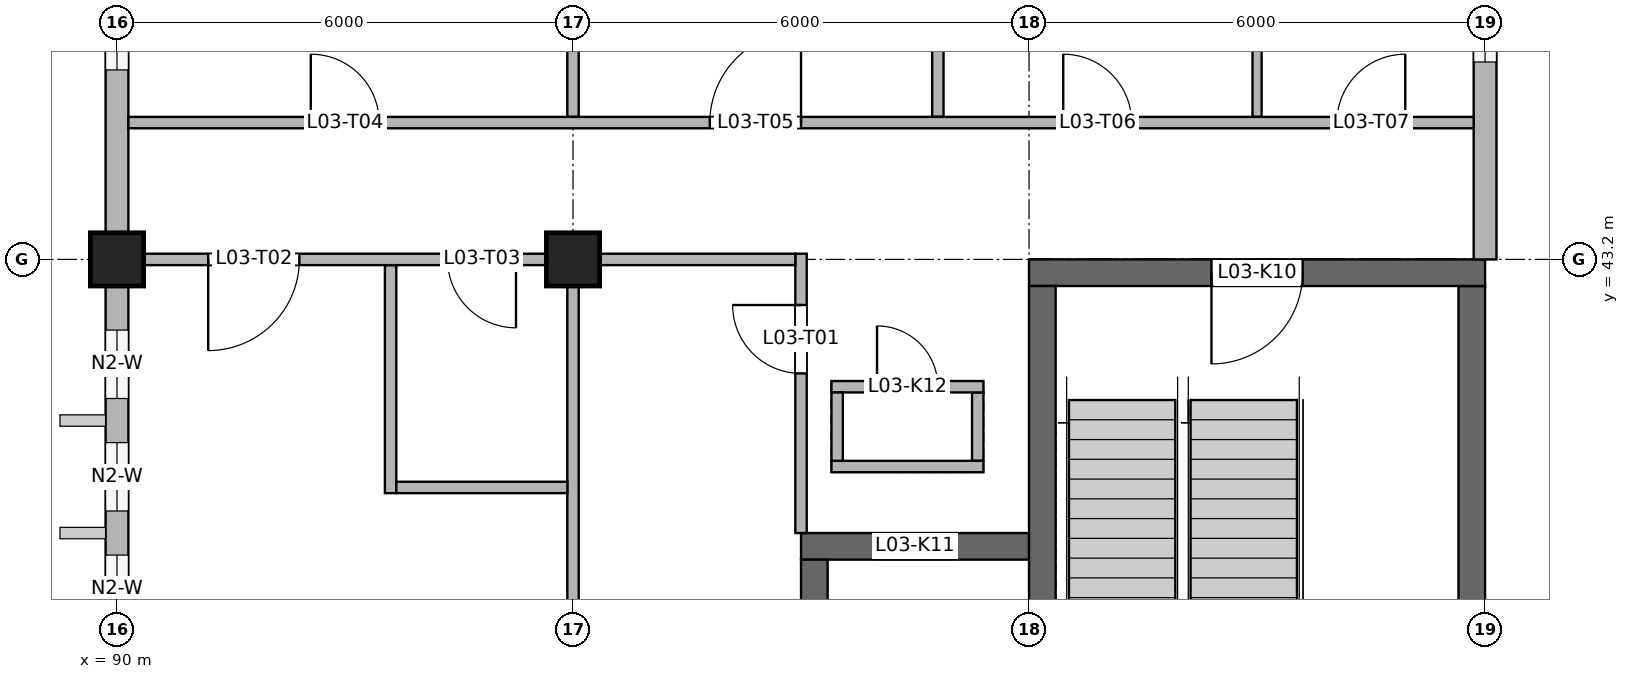
"""IFC4 building model, lengths in metres.
Left out: names, types, materials, properties, quantities, classifications, styles, units other than length and angle.
Written with IfcOpenShell. Run it as: python <this file> out.ifc"""

import sys

from ifc_helpers import new_model, si_unit, direction, frame, frame_2d, origin, origin_2d, place, context, subcontext, project, spatial, rectangle, extrude, element, fill, save


model = new_model("IFC4")
c1 = context("Model", 3, precision=1e-05, world=origin(), true_north=direction((0.0, 1.0)))
c2 = subcontext(c1, "Body", "Model", "MODEL_VIEW")
j1 = project(units=[si_unit("LENGTHUNIT", "METRE"), si_unit("PLANEANGLEUNIT", "RADIAN")], contexts=[c1])
p1 = place(None, origin())
s1 = spatial("IfcSite", under=j1, at=p1, CompositionType="ELEMENT")
p2 = place(p1, origin())
s2 = spatial("IfcBuilding", under=s1, at=p2, CompositionType="ELEMENT")
p3 = place(p2, frame((0.0, 0.0, 12.6)))
s3 = spatial("IfcBuildingStorey", under=s2, at=p3, CompositionType="ELEMENT", Elevation=12.6)
p4 = place(p3, frame((102.0, 43.025, 0.0), z_axis=(0.0, 0.0, 1.0), x_axis=(1.0, 0.0, 0.0)))
e1 = element("IfcWall", 1, at=p4, inside=s3, PredefinedType="SHEAR", context=c2, shape_type="SweptSolid", body=[
    extrude(rectangle(XDim=6.0, YDim=0.35, at=frame_2d((3.0, 0.0))), origin(), (0.0, 0.0, 1.0), 4.0),
])
p5 = place(p4, frame((2.4, 0.0, 0.0)))
e2 = element("IfcOpeningElement", 2, at=p5, cuts=e1, PredefinedType="OPENING", context=c2, shape_type="SweptSolid", body=[
    extrude(rectangle(XDim=1.2, YDim=2.1, at=frame_2d((0.6, 1.05))), frame((0.0, 0.185, 0.0), z_axis=(0.0, -1.0, 0.0), x_axis=(1.0, 0.0, 0.0)), (0.0, 0.0, 1.0), 0.37),
])
for number, where, z_axis, x_axis in (
    (3, (102.175, 36.35, 0.0), (0.0, 0.0, 1.0), (0.0, 1.0, 0.0)),
    (4, (107.825, 36.35, 0.0), (0.0, 0.0, 1.0), (0.0, 1.0, 0.0)),
):
    element("IfcWall", number, at=place(p3, frame(where, z_axis=z_axis, x_axis=x_axis)), inside=s3, PredefinedType="SHEAR", context=c2, shape_type="SweptSolid", body=[
        extrude(rectangle(XDim=6.5, YDim=0.35, at=frame_2d((3.25, 0.0))), origin(), (0.0, 0.0, 1.0), 4.0),
    ])
p6 = place(p3, frame((99.0, 39.425, 0.0), z_axis=(0.0, 0.0, 1.0), x_axis=(1.0, 0.0, 0.0)))
e5 = element("IfcWall", 5, at=p6, inside=s3, PredefinedType="SHEAR", context=c2, shape_type="SweptSolid", body=[
    extrude(rectangle(XDim=3.0, YDim=0.35, at=frame_2d((1.5, 0.0))), origin(), (0.0, 0.0, 1.0), 4.2),
])
p7 = place(p6, frame((0.95, 0.0, 0.0)))
e6 = element("IfcOpeningElement", 6, at=p7, cuts=e5, PredefinedType="OPENING", context=c2, shape_type="SweptSolid", body=[
    extrude(rectangle(XDim=1.1, YDim=2.1, at=frame_2d((0.55, 1.05))), frame((0.0, 0.185, 0.0), z_axis=(0.0, -1.0, 0.0), x_axis=(1.0, 0.0, 0.0)), (0.0, 0.0, 1.0), 0.37),
])
p8 = place(p3, frame((99.175, 36.35, 0.0), z_axis=(0.0, 0.0, 1.0), x_axis=(0.0, 1.0, 0.0)))
e7 = element("IfcWall", 7, at=p8, inside=s3, PredefinedType="SHEAR", context=c2, shape_type="SweptSolid", body=[
    extrude(rectangle(XDim=2.9, YDim=0.35, at=frame_2d((1.45, 0.0))), origin(), (0.0, 0.0, 1.0), 4.2),
])
p9 = place(p3, frame((99.4, 40.475, 0.0), z_axis=(0.0, 0.0, 1.0), x_axis=(1.0, 0.0, 0.0)))
e8 = element("IfcWall", 8, at=p9, inside=s3, PredefinedType="SOLIDWALL", context=c2, shape_type="SweptSolid", body=[
    extrude(rectangle(XDim=2.0, YDim=0.15, at=frame_2d((1.0, 0.0))), origin(), (0.0, 0.0, 1.0), 4.2),
])
p10 = place(p3, frame((99.4, 41.525, 0.0), z_axis=(0.0, 0.0, 1.0), x_axis=(1.0, 0.0, 0.0)))
e9 = element("IfcWall", 9, at=p10, inside=s3, PredefinedType="SOLIDWALL", context=c2, shape_type="SweptSolid", body=[
    extrude(rectangle(XDim=2.0, YDim=0.15, at=frame_2d((1.0, 0.0))), origin(), (0.0, 0.0, 1.0), 4.2),
])
p11 = place(p10, frame((0.6, 0.0, 0.0)))
e10 = element("IfcOpeningElement", 10, at=p11, cuts=e9, PredefinedType="OPENING", context=c2, shape_type="SweptSolid", body=[
    extrude(rectangle(XDim=0.8, YDim=2.1, at=frame_2d((0.4, 1.05))), frame((0.0, 0.085, 0.0), z_axis=(0.0, -1.0, 0.0), x_axis=(1.0, 0.0, 0.0)), (0.0, 0.0, 1.0), 0.17),
])
for number, where, z_axis, x_axis in (
    (11, (99.475, 40.55, 0.0), (0.0, 0.0, 1.0), (0.0, 1.0, 0.0)),
    (12, (101.325, 40.55, 0.0), (0.0, 0.0, 1.0), (0.0, 1.0, 0.0)),
):
    element("IfcWall", number, at=place(p3, frame(where, z_axis=z_axis, x_axis=x_axis)), inside=s3, PredefinedType="SOLIDWALL", context=c2, shape_type="SweptSolid", body=[
        extrude(rectangle(XDim=0.9, YDim=0.15, at=frame_2d((0.45, 0.0))), origin(), (0.0, 0.0, 1.0), 4.2),
    ])
for number, where, z_axis, x_axis in (
    (13, (90.0, 43.2, 0.0), (0.0, 0.0, 1.0), (1.0, 0.0, 0.0)),
    (14, (96.0, 43.2, 0.0), (0.0, 0.0, 1.0), (1.0, 0.0, 0.0)),
):
    element("IfcColumn", number, at=place(p3, frame(where, z_axis=z_axis, x_axis=x_axis)), inside=s3, PredefinedType="COLUMN", context=c2, shape_type="SweptSolid", body=[
        extrude(rectangle(XDim=0.7, YDim=0.7, at=origin_2d()), origin(), (0.0, 0.0, 1.0), 4.0),
    ])
p12 = place(p3, frame((90.0, 36.35, 0.0), z_axis=(0.0, 0.0, 1.0), x_axis=(0.0, 1.0, 0.0)))
e15 = element("IfcWall", 15, at=p12, inside=s3, PredefinedType="SOLIDWALL", context=c2, shape_type="SweptSolid", body=[
    extrude(rectangle(XDim=6.5, YDim=0.3, at=frame_2d((3.25, 0.0))), origin(), (0.0, 0.0, 1.0), 3.2),
])
p13 = place(p12, frame((0.58, 0.0, 0.9)))
e16 = element("IfcOpeningElement", 16, at=p13, cuts=e15, PredefinedType="OPENING", context=c2, shape_type="SweptSolid", body=[
    extrude(rectangle(XDim=0.9, YDim=1.2, at=frame_2d((0.45, 0.6))), frame((0.0, 0.16, 0.0), z_axis=(0.0, -1.0, 0.0), x_axis=(1.0, 0.0, 0.0)), (0.0, 0.0, 1.0), 0.32),
])
p14 = place(p12, frame((2.06, 0.0, 0.9)))
e17 = element("IfcOpeningElement", 17, at=p14, cuts=e15, PredefinedType="OPENING", context=c2, shape_type="SweptSolid", body=[
    extrude(rectangle(XDim=0.9, YDim=1.2, at=frame_2d((0.45, 0.6))), frame((0.0, 0.16, 0.0), z_axis=(0.0, -1.0, 0.0), x_axis=(1.0, 0.0, 0.0)), (0.0, 0.0, 1.0), 0.32),
])
p15 = place(p12, frame((3.54, 0.0, 0.9)))
e18 = element("IfcOpeningElement", 18, at=p15, cuts=e15, PredefinedType="OPENING", context=c2, shape_type="SweptSolid", body=[
    extrude(rectangle(XDim=0.9, YDim=1.2, at=frame_2d((0.45, 0.6))), frame((0.0, 0.16, 0.0), z_axis=(0.0, -1.0, 0.0), x_axis=(1.0, 0.0, 0.0)), (0.0, 0.0, 1.0), 0.32),
])
p16 = place(p12, frame((5.02, 0.0, 0.9)))
e19 = element("IfcOpeningElement", 19, at=p16, cuts=e15, PredefinedType="OPENING", context=c2, shape_type="SweptSolid", body=[
    extrude(rectangle(XDim=0.9, YDim=1.2, at=frame_2d((0.45, 0.6))), frame((0.0, 0.16, 0.0), z_axis=(0.0, -1.0, 0.0), x_axis=(1.0, 0.0, 0.0)), (0.0, 0.0, 1.0), 0.32),
])
p17 = place(p3, frame((90.0, 43.55, 0.0), z_axis=(0.0, 0.0, 1.0), x_axis=(0.0, 1.0, 0.0)))
e20 = element("IfcWall", 20, at=p17, inside=s3, PredefinedType="SOLIDWALL", context=c2, shape_type="SweptSolid", body=[
    extrude(rectangle(XDim=6.85, YDim=0.3, at=frame_2d((3.425, 0.0))), origin(), (0.0, 0.0, 1.0), 3.1),
])
p18 = place(p17, frame((2.143, 0.0, 0.9)))
e21 = element("IfcOpeningElement", 21, at=p18, cuts=e20, PredefinedType="OPENING", context=c2, shape_type="SweptSolid", body=[
    extrude(rectangle(XDim=0.9, YDim=1.2, at=frame_2d((0.45, 0.6))), frame((0.0, 0.16, 0.0), z_axis=(0.0, -1.0, 0.0), x_axis=(1.0, 0.0, 0.0)), (0.0, 0.0, 1.0), 0.32),
])
p19 = place(p17, frame((3.457, 0.0, 0.9)))
e22 = element("IfcOpeningElement", 22, at=p19, cuts=e20, PredefinedType="OPENING", context=c2, shape_type="SweptSolid", body=[
    extrude(rectangle(XDim=0.9, YDim=1.2, at=frame_2d((0.45, 0.6))), frame((0.0, 0.16, 0.0), z_axis=(0.0, -1.0, 0.0), x_axis=(1.0, 0.0, 0.0)), (0.0, 0.0, 1.0), 0.32),
])
p20 = place(p3, frame((108.0, 43.2, 0.0), z_axis=(0.0, 0.0, 1.0), x_axis=(0.0, 1.0, 0.0)))
e23 = element("IfcWall", 23, at=p20, inside=s3, PredefinedType="SOLIDWALL", context=c2, shape_type="SweptSolid", body=[
    extrude(rectangle(XDim=6.85, YDim=0.3, at=frame_2d((3.425, 0.0))), origin(), (0.0, 0.0, 1.0), 3.1),
])
p21 = place(p20, frame((2.597, 0.0, 0.9)))
e24 = element("IfcOpeningElement", 24, at=p21, cuts=e23, PredefinedType="OPENING", context=c2, shape_type="SweptSolid", body=[
    extrude(rectangle(XDim=0.9, YDim=1.2, at=frame_2d((0.45, 0.6))), frame((0.0, 0.16, 0.0), z_axis=(0.0, -1.0, 0.0), x_axis=(1.0, 0.0, 0.0)), (0.0, 0.0, 1.0), 0.32),
])
p22 = place(p20, frame((4.015, 0.0, 0.9)))
e25 = element("IfcOpeningElement", 25, at=p22, cuts=e23, PredefinedType="OPENING", context=c2, shape_type="SweptSolid", body=[
    extrude(rectangle(XDim=0.9, YDim=1.2, at=frame_2d((0.45, 0.6))), frame((0.0, 0.16, 0.0), z_axis=(0.0, -1.0, 0.0), x_axis=(1.0, 0.0, 0.0)), (0.0, 0.0, 1.0), 0.32),
])
p23 = place(p20, frame((5.433, 0.0, 0.9)))
e26 = element("IfcOpeningElement", 26, at=p23, cuts=e23, PredefinedType="OPENING", context=c2, shape_type="SweptSolid", body=[
    extrude(rectangle(XDim=0.9, YDim=1.2, at=frame_2d((0.45, 0.6))), frame((0.0, 0.16, 0.0), z_axis=(0.0, -1.0, 0.0), x_axis=(1.0, 0.0, 0.0)), (0.0, 0.0, 1.0), 0.32),
])
p24 = place(p3, frame((93.6, 40.125, 0.0), z_axis=(0.0, 0.0, 1.0), x_axis=(0.0, 1.0, 0.0)))
e27 = element("IfcWall", 27, at=p24, inside=s3, PredefinedType="PARTITIONING", context=c2, shape_type="SweptSolid", body=[
    extrude(rectangle(XDim=3.0, YDim=0.15, at=frame_2d((1.5, 0.0))), origin(), (0.0, 0.0, 1.0), 3.3),
])
p25 = place(p3, frame((96.0, 36.15, 0.0), z_axis=(0.0, 0.0, 1.0), x_axis=(0.0, 1.0, 0.0)))
e28 = element("IfcWall", 28, at=p25, inside=s3, PredefinedType="PARTITIONING", context=c2, shape_type="SweptSolid", body=[
    extrude(rectangle(XDim=6.975, YDim=0.15, at=frame_2d((3.488, 0.0))), origin(), (0.0, 0.0, 1.0), 3.2),
])
p26 = place(p3, frame((96.0, 45.075, 0.0), z_axis=(0.0, 0.0, 1.0), x_axis=(0.0, 1.0, 0.0)))
e29 = element("IfcWall", 29, at=p26, inside=s3, PredefinedType="PARTITIONING", context=c2, shape_type="SweptSolid", body=[
    extrude(rectangle(XDim=5.325, YDim=0.15, at=frame_2d((2.663, 0.0))), origin(), (0.0, 0.0, 1.0), 4.0),
])
p27 = place(p3, frame((99.0, 39.6, 0.0), z_axis=(0.0, 0.0, 1.0), x_axis=(0.0, 1.0, 0.0)))
e30 = element("IfcWall", 30, at=p27, inside=s3, PredefinedType="PARTITIONING", context=c2, shape_type="SweptSolid", body=[
    extrude(rectangle(XDim=3.675, YDim=0.15, at=frame_2d((1.837, 0.0))), origin(), (0.0, 0.0, 1.0), 4.0),
])
p28 = place(p27, frame((2.1, 0.0, 0.0)))
e31 = element("IfcOpeningElement", 31, at=p28, cuts=e30, PredefinedType="OPENING", context=c2, shape_type="SweptSolid", body=[
    extrude(rectangle(XDim=0.9, YDim=2.1, at=frame_2d((0.45, 1.05))), frame((0.0, 0.085, 0.0), z_axis=(0.0, -1.0, 0.0), x_axis=(1.0, 0.0, 0.0)), (0.0, 0.0, 1.0), 0.17),
])
p29 = place(p3, frame((100.8, 45.075, 0.0), z_axis=(0.0, 0.0, 1.0), x_axis=(0.0, 1.0, 0.0)))
e32 = element("IfcWall", 32, at=p29, inside=s3, PredefinedType="PARTITIONING", context=c2, shape_type="SweptSolid", body=[
    extrude(rectangle(XDim=12.375, YDim=0.15, at=frame_2d((6.188, 0.0))), origin(), (0.0, 0.0, 1.0), 4.0),
])
p30 = place(p3, frame((105.0, 45.075, 0.0), z_axis=(0.0, 0.0, 1.0), x_axis=(0.0, 1.0, 0.0)))
e33 = element("IfcWall", 33, at=p30, inside=s3, PredefinedType="PARTITIONING", context=c2, shape_type="SweptSolid", body=[
    extrude(rectangle(XDim=12.375, YDim=0.12, at=frame_2d((6.188, 0.0))), origin(), (0.0, 0.0, 1.0), 3.3),
])
p31 = place(p3, frame((93.675, 40.2, 0.0), z_axis=(0.0, 0.0, 1.0), x_axis=(1.0, 0.0, 0.0)))
e34 = element("IfcWall", 34, at=p31, inside=s3, PredefinedType="PARTITIONING", context=c2, shape_type="SweptSolid", body=[
    extrude(rectangle(XDim=2.25, YDim=0.15, at=frame_2d((1.125, 0.0))), origin(), (0.0, 0.0, 1.0), 3.2),
])
p32 = place(p3, frame((90.15, 43.2, 0.0), z_axis=(0.0, 0.0, 1.0), x_axis=(1.0, 0.0, 0.0)))
e35 = element("IfcWall", 35, at=p32, inside=s3, PredefinedType="PARTITIONING", context=c2, shape_type="SweptSolid", body=[
    extrude(rectangle(XDim=8.775, YDim=0.15, at=frame_2d((4.388, 0.0))), origin(), (0.0, 0.0, 1.0), 3.3),
])
p33 = place(p32, frame((1.05, 0.0, 0.0)))
e36 = element("IfcOpeningElement", 36, at=p33, cuts=e35, PredefinedType="OPENING", context=c2, shape_type="SweptSolid", body=[
    extrude(rectangle(XDim=1.2, YDim=2.1, at=frame_2d((0.6, 1.05))), frame((0.0, 0.085, 0.0), z_axis=(0.0, -1.0, 0.0), x_axis=(1.0, 0.0, 0.0)), (0.0, 0.0, 1.0), 0.17),
])
p34 = place(p32, frame((4.2, 0.0, 0.0)))
e37 = element("IfcOpeningElement", 37, at=p34, cuts=e35, PredefinedType="OPENING", context=c2, shape_type="SweptSolid", body=[
    extrude(rectangle(XDim=0.9, YDim=2.1, at=frame_2d((0.45, 1.05))), frame((0.0, 0.085, 0.0), z_axis=(0.0, -1.0, 0.0), x_axis=(1.0, 0.0, 0.0)), (0.0, 0.0, 1.0), 0.17),
])
p35 = place(p3, frame((90.15, 45.0, 0.0), z_axis=(0.0, 0.0, 1.0), x_axis=(1.0, 0.0, 0.0)))
e38 = element("IfcWall", 38, at=p35, inside=s3, PredefinedType="PARTITIONING", context=c2, shape_type="SweptSolid", body=[
    extrude(rectangle(XDim=17.7, YDim=0.15, at=frame_2d((8.85, 0.0))), origin(), (0.0, 0.0, 1.0), 4.0),
])
p36 = place(p35, frame((2.4, 0.0, 0.0)))
e39 = element("IfcOpeningElement", 39, at=p36, cuts=e38, PredefinedType="OPENING", context=c2, shape_type="SweptSolid", body=[
    extrude(rectangle(XDim=0.9, YDim=2.1, at=frame_2d((0.45, 1.05))), frame((0.0, 0.085, 0.0), z_axis=(0.0, -1.0, 0.0), x_axis=(1.0, 0.0, 0.0)), (0.0, 0.0, 1.0), 0.17),
])
p37 = place(p35, frame((7.65, 0.0, 0.0)))
e40 = element("IfcOpeningElement", 40, at=p37, cuts=e38, PredefinedType="OPENING", context=c2, shape_type="SweptSolid", body=[
    extrude(rectangle(XDim=1.2, YDim=2.1, at=frame_2d((0.6, 1.05))), frame((0.0, 0.085, 0.0), z_axis=(0.0, -1.0, 0.0), x_axis=(1.0, 0.0, 0.0)), (0.0, 0.0, 1.0), 0.17),
])
p38 = place(p35, frame((12.3, 0.0, 0.0)))
e41 = element("IfcOpeningElement", 41, at=p38, cuts=e38, PredefinedType="OPENING", context=c2, shape_type="SweptSolid", body=[
    extrude(rectangle(XDim=0.9, YDim=2.1, at=frame_2d((0.45, 1.05))), frame((0.0, 0.085, 0.0), z_axis=(0.0, -1.0, 0.0), x_axis=(1.0, 0.0, 0.0)), (0.0, 0.0, 1.0), 0.17),
])
p39 = place(p35, frame((15.9, 0.0, 0.0)))
e42 = element("IfcOpeningElement", 42, at=p39, cuts=e38, PredefinedType="OPENING", context=c2, shape_type="SweptSolid", body=[
    extrude(rectangle(XDim=0.9, YDim=2.1, at=frame_2d((0.45, 1.05))), frame((0.0, 0.085, 0.0), z_axis=(0.0, -1.0, 0.0), x_axis=(1.0, 0.0, 0.0)), (0.0, 0.0, 1.0), 0.17),
])
p40 = place(p14, origin())
e43 = element("IfcWindow", 43, at=p40, inside=s3, PartitioningType="SINGLE_PANEL", PredefinedType="WINDOW", context=c2, shape_type="SweptSolid", body=[
    extrude(rectangle(XDim=0.9, YDim=1.2, at=frame_2d((0.45, 0.6))), frame((0.0, 0.03, 0.0), z_axis=(0.0, -1.0, 0.0), x_axis=(1.0, 0.0, 0.0)), (0.0, 0.0, 1.0), 0.06),
])
fill(e17, e43)
p41 = place(p15, origin())
e44 = element("IfcWindow", 44, at=p41, inside=s3, PartitioningType="SINGLE_PANEL", PredefinedType="WINDOW", context=c2, shape_type="SweptSolid", body=[
    extrude(rectangle(XDim=0.9, YDim=1.2, at=frame_2d((0.45, 0.6))), frame((0.0, 0.03, 0.0), z_axis=(0.0, -1.0, 0.0), x_axis=(1.0, 0.0, 0.0)), (0.0, 0.0, 1.0), 0.06),
])
fill(e18, e44)
p42 = place(p16, origin())
e45 = element("IfcWindow", 45, at=p42, inside=s3, PartitioningType="SINGLE_PANEL", PredefinedType="WINDOW", context=c2, shape_type="SweptSolid", body=[
    extrude(rectangle(XDim=0.9, YDim=1.2, at=frame_2d((0.45, 0.6))), frame((0.0, 0.03, 0.0), z_axis=(0.0, -1.0, 0.0), x_axis=(1.0, 0.0, 0.0)), (0.0, 0.0, 1.0), 0.06),
])
fill(e19, e45)
p43 = place(p18, origin())
e46 = element("IfcWindow", 46, at=p43, inside=s3, PartitioningType="SINGLE_PANEL", PredefinedType="WINDOW", context=c2, shape_type="SweptSolid", body=[
    extrude(rectangle(XDim=0.9, YDim=1.2, at=frame_2d((0.45, 0.6))), frame((0.0, 0.03, 0.0), z_axis=(0.0, -1.0, 0.0), x_axis=(1.0, 0.0, 0.0)), (0.0, 0.0, 1.0), 0.06),
])
fill(e21, e46)
p44 = place(p21, origin())
e47 = element("IfcWindow", 47, at=p44, inside=s3, PartitioningType="SINGLE_PANEL", PredefinedType="WINDOW", context=c2, shape_type="SweptSolid", body=[
    extrude(rectangle(XDim=0.9, YDim=1.2, at=frame_2d((0.45, 0.6))), frame((0.0, 0.03, 0.0), z_axis=(0.0, -1.0, 0.0), x_axis=(1.0, 0.0, 0.0)), (0.0, 0.0, 1.0), 0.06),
])
fill(e24, e47)
p45 = place(p5, frame((1.2, 0.0, 0.0), z_axis=(0.0, 0.0, 1.0), x_axis=(-1.0, 0.0, 0.0)))
e48 = element("IfcDoor", 48, at=p45, inside=s3, OperationType="SINGLE_SWING_RIGHT", PredefinedType="DOOR", context=c2, shape_type="SweptSolid", body=[
    extrude(rectangle(XDim=1.2, YDim=2.1, at=frame_2d((0.6, 1.05))), frame((0.0, 0.025, 0.0), z_axis=(0.0, -1.0, 0.0), x_axis=(1.0, 0.0, 0.0)), (0.0, 0.0, 1.0), 0.05),
])
fill(e2, e48)
p46 = place(p7, origin())
e49 = element("IfcDoor", 49, at=p46, inside=s3, OperationType="DOUBLE_DOOR_SLIDING", PredefinedType="DOOR", context=c2, shape_type="SweptSolid", body=[
    extrude(rectangle(XDim=1.1, YDim=2.1, at=frame_2d((0.55, 1.05))), frame((0.0, 0.025, 0.0), z_axis=(0.0, -1.0, 0.0), x_axis=(1.0, 0.0, 0.0)), (0.0, 0.0, 1.0), 0.05),
])
fill(e6, e49)
p47 = place(p11, origin())
e50 = element("IfcDoor", 50, at=p47, inside=s3, OperationType="SINGLE_SWING_LEFT", PredefinedType="DOOR", context=c2, shape_type="SweptSolid", body=[
    extrude(rectangle(XDim=0.8, YDim=2.1, at=frame_2d((0.4, 1.05))), frame((0.0, 0.025, 0.0), z_axis=(0.0, -1.0, 0.0), x_axis=(1.0, 0.0, 0.0)), (0.0, 0.0, 1.0), 0.05),
])
fill(e10, e50)
p48 = place(p28, origin())
e51 = element("IfcDoor", 51, at=p48, inside=s3, OperationType="SINGLE_SWING_RIGHT", PredefinedType="DOOR", context=c2, shape_type="SweptSolid", body=[
    extrude(rectangle(XDim=0.9, YDim=2.1, at=frame_2d((0.45, 1.05))), frame((0.0, 0.025, 0.0), z_axis=(0.0, -1.0, 0.0), x_axis=(1.0, 0.0, 0.0)), (0.0, 0.0, 1.0), 0.05),
])
fill(e31, e51)
p49 = place(p33, frame((1.2, 0.0, 0.0), z_axis=(0.0, 0.0, 1.0), x_axis=(-1.0, 0.0, 0.0)))
e52 = element("IfcDoor", 52, at=p49, inside=s3, OperationType="SINGLE_SWING_RIGHT", PredefinedType="DOOR", context=c2, shape_type="SweptSolid", body=[
    extrude(rectangle(XDim=1.2, YDim=2.1, at=frame_2d((0.6, 1.05))), frame((0.0, 0.025, 0.0), z_axis=(0.0, -1.0, 0.0), x_axis=(1.0, 0.0, 0.0)), (0.0, 0.0, 1.0), 0.05),
])
fill(e36, e52)
p50 = place(p34, frame((0.9, 0.0, 0.0), z_axis=(0.0, 0.0, 1.0), x_axis=(-1.0, 0.0, 0.0)))
e53 = element("IfcDoor", 53, at=p50, inside=s3, OperationType="SINGLE_SWING_LEFT", PredefinedType="DOOR", context=c2, shape_type="SweptSolid", body=[
    extrude(rectangle(XDim=0.9, YDim=2.1, at=frame_2d((0.45, 1.05))), frame((0.0, 0.025, 0.0), z_axis=(0.0, -1.0, 0.0), x_axis=(1.0, 0.0, 0.0)), (0.0, 0.0, 1.0), 0.05),
])
fill(e37, e53)
p51 = place(p36, origin())
e54 = element("IfcDoor", 54, at=p51, inside=s3, OperationType="SINGLE_SWING_LEFT", PredefinedType="DOOR", context=c2, shape_type="SweptSolid", body=[
    extrude(rectangle(XDim=0.9, YDim=2.1, at=frame_2d((0.45, 1.05))), frame((0.0, 0.025, 0.0), z_axis=(0.0, -1.0, 0.0), x_axis=(1.0, 0.0, 0.0)), (0.0, 0.0, 1.0), 0.05),
])
fill(e39, e54)
p52 = place(p37, origin())
e55 = element("IfcDoor", 55, at=p52, inside=s3, OperationType="SINGLE_SWING_RIGHT", PredefinedType="DOOR", context=c2, shape_type="SweptSolid", body=[
    extrude(rectangle(XDim=1.2, YDim=2.1, at=frame_2d((0.6, 1.05))), frame((0.0, 0.025, 0.0), z_axis=(0.0, -1.0, 0.0), x_axis=(1.0, 0.0, 0.0)), (0.0, 0.0, 1.0), 0.05),
])
fill(e40, e55)
p53 = place(p38, origin())
e56 = element("IfcDoor", 56, at=p53, inside=s3, OperationType="SINGLE_SWING_LEFT", PredefinedType="DOOR", context=c2, shape_type="SweptSolid", body=[
    extrude(rectangle(XDim=0.9, YDim=2.1, at=frame_2d((0.45, 1.05))), frame((0.0, 0.025, 0.0), z_axis=(0.0, -1.0, 0.0), x_axis=(1.0, 0.0, 0.0)), (0.0, 0.0, 1.0), 0.05),
])
fill(e41, e56)
p54 = place(p39, origin())
e57 = element("IfcDoor", 57, at=p54, inside=s3, OperationType="SINGLE_SWING_RIGHT", PredefinedType="DOOR", context=c2, shape_type="SweptSolid", body=[
    extrude(rectangle(XDim=0.9, YDim=2.1, at=frame_2d((0.45, 1.05))), frame((0.0, 0.025, 0.0), z_axis=(0.0, -1.0, 0.0), x_axis=(1.0, 0.0, 0.0)), (0.0, 0.0, 1.0), 0.05),
])
fill(e42, e57)
save(model, sys.argv[1])
